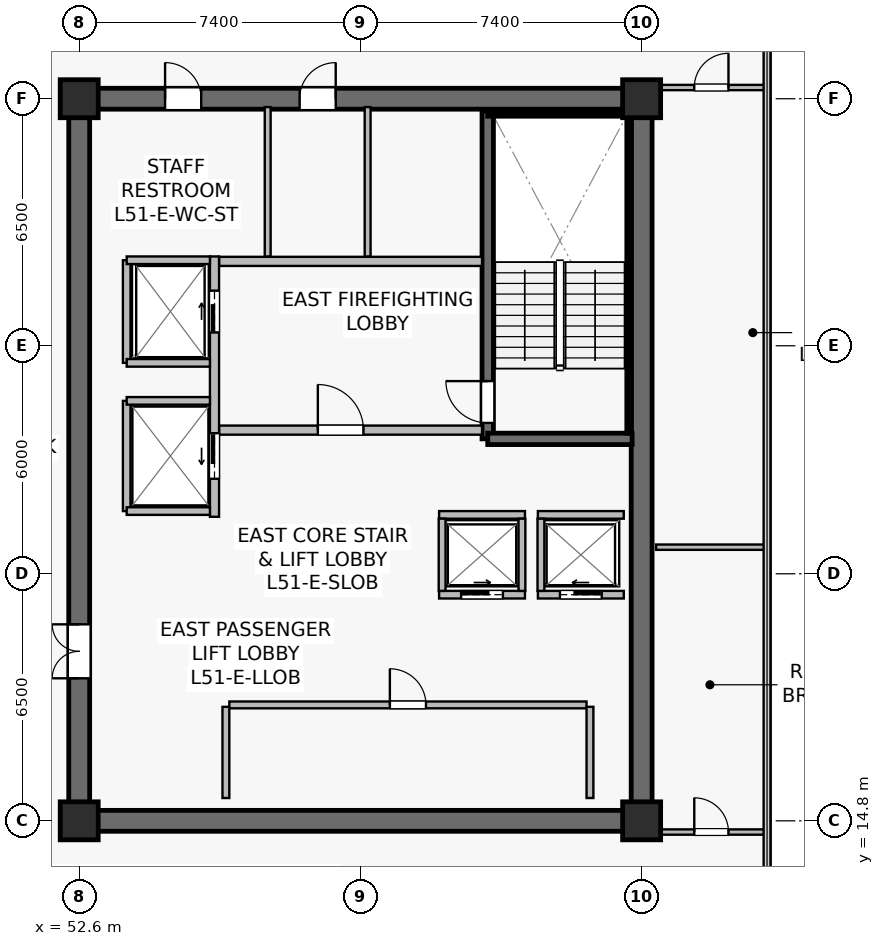
"""IFC4 building model, lengths in metres.
Left out: names, types, materials, properties, quantities, classifications, styles, units other than length and angle.
Written with IfcOpenShell. Run it as: python <this file> out.ifc"""

import sys

from ifc_helpers import new_model, si_unit, direction, frame, frame_2d, origin, origin_2d, place, context, subcontext, project, spatial, rectangle, extrude, source, transform, mapped, element, fill, save


model = new_model("IFC4")
c1 = context("Model", 3, precision=1e-05, world=origin(), true_north=direction((0.0, 1.0)))
c2 = subcontext(c1, "Body", "Model", "MODEL_VIEW")
j1 = project(units=[si_unit("LENGTHUNIT", "METRE"), si_unit("PLANEANGLEUNIT", "RADIAN")], contexts=[c1])
p1 = place(None, origin())
s1 = spatial("IfcSite", under=j1, at=p1, CompositionType="ELEMENT")
p2 = place(p1, origin())
s2 = spatial("IfcBuilding", under=s1, at=p2, CompositionType="ELEMENT")
p3 = place(p2, frame((0.0, 0.0, 213.7)))
s3 = spatial("IfcBuildingStorey", under=s2, at=p3, CompositionType="ELEMENT", Elevation=213.7)
p4 = place(p3, frame((52.325, 14.8, 0.0), z_axis=(0.0, 0.0, 1.0), x_axis=(1.0, 0.0, 0.0)))
e1 = element("IfcWall", 1, at=p4, inside=s3, PredefinedType="SHEAR", context=c2, shape_type="SweptSolid", body=[
    extrude(rectangle(XDim=15.35, YDim=0.55, at=frame_2d((7.675, 0.0))), origin(), (0.0, 0.0, 1.0), 3.8),
])
p5 = place(p3, frame((52.325, 33.8, 0.0), z_axis=(0.0, 0.0, 1.0), x_axis=(1.0, 0.0, 0.0)))
e2 = element("IfcWall", 2, at=p5, inside=s3, PredefinedType="SHEAR", context=c2, shape_type="SweptSolid", body=[
    extrude(rectangle(XDim=15.35, YDim=0.55, at=frame_2d((7.675, 0.0))), origin(), (0.0, 0.0, 1.0), 3.8),
])
p6 = place(p5, frame((6.075, 0.0, 0.0)))
e3 = element("IfcOpeningElement", 3, at=p6, cuts=e2, PredefinedType="OPENING", context=c2, shape_type="SweptSolid", body=[
    extrude(rectangle(XDim=0.95, YDim=2.15, at=frame_2d((0.475, 1.075))), frame((0.0, 0.285, 0.0), z_axis=(0.0, -1.0, 0.0), x_axis=(1.0, 0.0, 0.0)), (0.0, 0.0, 1.0), 0.57),
])
p7 = place(p5, frame((2.535, 0.0, 0.0)))
e4 = element("IfcOpeningElement", 4, at=p7, cuts=e2, PredefinedType="OPENING", context=c2, shape_type="SweptSolid", body=[
    extrude(rectangle(XDim=0.95, YDim=2.15, at=frame_2d((0.475, 1.075))), frame((0.0, 0.285, 0.0), z_axis=(0.0, -1.0, 0.0), x_axis=(1.0, 0.0, 0.0)), (0.0, 0.0, 1.0), 0.57),
])
p8 = place(p3, frame((52.6, 15.075, 0.0), z_axis=(0.0, 0.0, 1.0), x_axis=(0.0, 1.0, 0.0)))
e5 = element("IfcWall", 5, at=p8, inside=s3, PredefinedType="SHEAR", context=c2, shape_type="SweptSolid", body=[
    extrude(rectangle(XDim=18.45, YDim=0.55, at=frame_2d((9.225, 0.0))), origin(), (0.0, 0.0, 1.0), 3.8),
])
p9 = place(p8, frame((3.475, 0.0, 0.0)))
e6 = element("IfcOpeningElement", 6, at=p9, cuts=e5, PredefinedType="OPENING", context=c2, shape_type="SweptSolid", body=[
    extrude(rectangle(XDim=1.42, YDim=2.2, at=frame_2d((0.71, 1.1))), frame((0.0, 0.285, 0.0), z_axis=(0.0, -1.0, 0.0), x_axis=(1.0, 0.0, 0.0)), (0.0, 0.0, 1.0), 0.57),
])
p10 = place(p3, frame((67.4, 15.075, 0.0), z_axis=(0.0, 0.0, 1.0), x_axis=(0.0, 1.0, 0.0)))
e7 = element("IfcWall", 7, at=p10, inside=s3, PredefinedType="SHEAR", context=c2, shape_type="SweptSolid", body=[
    extrude(rectangle(XDim=18.45, YDim=0.55, at=frame_2d((9.225, 0.0))), origin(), (0.0, 0.0, 1.0), 3.8),
])
p11 = place(p3, frame((63.35, 24.85, 0.0), z_axis=(0.0, 0.0, 1.0), x_axis=(0.0, 1.0, 0.0)))
e8 = element("IfcWall", 8, at=p11, inside=s3, PredefinedType="SHEAR", context=c2, shape_type="SweptSolid", body=[
    extrude(rectangle(XDim=8.63, YDim=0.3, at=frame_2d((4.315, 0.0))), origin(), (0.0, 0.0, 1.0), 3.8),
])
p12 = place(p11, frame((0.42, 0.0, 0.0)))
e9 = element("IfcOpeningElement", 9, at=p12, cuts=e8, PredefinedType="OPENING", context=c2, shape_type="SweptSolid", body=[
    extrude(rectangle(XDim=1.1, YDim=2.15, at=frame_2d((0.55, 1.075))), frame((0.0, 0.16, 0.0), z_axis=(0.0, -1.0, 0.0), x_axis=(1.0, 0.0, 0.0)), (0.0, 0.0, 1.0), 0.32),
])
p13 = place(p3, frame((63.35, 24.85, 0.0), z_axis=(0.0, 0.0, 1.0), x_axis=(1.0, 0.0, 0.0)))
e10 = element("IfcWall", 10, at=p13, inside=s3, PredefinedType="SHEAR", context=c2, shape_type="SweptSolid", body=[
    extrude(rectangle(XDim=3.8, YDim=0.3, at=frame_2d((1.9, 0.0))), origin(), (0.0, 0.0, 1.0), 3.8),
])
p14 = place(p3, frame((63.35, 33.4, 0.0), z_axis=(0.0, 0.0, 1.0), x_axis=(1.0, 0.0, 0.0)))
e11 = element("IfcWall", 11, at=p14, inside=s3, PredefinedType="SOLIDWALL", context=c2, shape_type="SweptSolid", body=[
    extrude(rectangle(XDim=3.72, YDim=0.12, at=frame_2d((1.86, 0.0))), origin(), (0.0, 0.0, 1.0), 3.8),
])
p15 = place(p3, frame((67.07, 25.0, 0.0), z_axis=(0.0, 0.0, 1.0), x_axis=(0.0, 1.0, 0.0)))
e12 = element("IfcWall", 12, at=p15, inside=s3, PredefinedType="SOLIDWALL", context=c2, shape_type="SweptSolid", body=[
    extrude(rectangle(XDim=8.32, YDim=0.12, at=frame_2d((4.16, 0.0))), origin(), (0.0, 0.0, 1.0), 3.8),
])
m1 = source(origin(), c2, "Body", "SweptSolid", [
    extrude(rectangle(XDim=1.0, YDim=1.0, at=origin_2d()), origin(), (0.0, 0.0, 1.0), 4.1),
])
for number, where, z_axis, x_axis in (
    (13, (52.6, 14.8, 0.0), (0.0, 0.0, 1.0), (1.0, 0.0, 0.0)),
    (14, (67.4, 14.8, 0.0), (0.0, 0.0, 1.0), (1.0, 0.0, 0.0)),
    (15, (52.6, 33.8, 0.0), (0.0, 0.0, 1.0), (1.0, 0.0, 0.0)),
    (16, (67.4, 33.8, 0.0), (0.0, 0.0, 1.0), (1.0, 0.0, 0.0)),
):
    element("IfcColumn", number, at=place(p3, frame(where, z_axis=z_axis, x_axis=x_axis)), inside=s3, PredefinedType="COLUMN", context=c2, shape_type="MappedRepresentation", body=[
        mapped(m1, transform((0.0, 0.0, 0.0), scale=1.0)),
    ])
p16 = place(p3, frame((56.28, 25.08, 0.0), z_axis=(0.0, 0.0, 1.0), x_axis=(1.0, 0.0, 0.0)))
e17 = element("IfcWall", 17, at=p16, inside=s3, PredefinedType="SOLIDWALL", context=c2, shape_type="SweptSolid", body=[
    extrude(rectangle(XDim=6.92, YDim=0.24, at=frame_2d((3.46, 0.0))), origin(), (0.0, 0.0, 1.0), 3.197),
])
p17 = place(p16, frame((2.6, 0.0, 0.0)))
e18 = element("IfcOpeningElement", 18, at=p17, cuts=e17, PredefinedType="OPENING", context=c2, shape_type="SweptSolid", body=[
    extrude(rectangle(XDim=1.2, YDim=2.16, at=frame_2d((0.6, 1.08))), frame((0.0, 0.13, 0.0), z_axis=(0.0, -1.0, 0.0), x_axis=(1.0, 0.0, 0.0)), (0.0, 0.0, 1.0), 0.26),
])
p18 = place(p3, frame((56.28, 29.52, 0.0), z_axis=(0.0, 0.0, 1.0), x_axis=(1.0, 0.0, 0.0)))
e19 = element("IfcWall", 19, at=p18, inside=s3, PredefinedType="SOLIDWALL", context=c2, shape_type="SweptSolid", body=[
    extrude(rectangle(XDim=6.92, YDim=0.24, at=frame_2d((3.46, 0.0))), origin(), (0.0, 0.0, 1.0), 3.197),
])
p19 = place(p3, frame((56.16, 22.8, 0.0), z_axis=(0.0, 0.0, 1.0), x_axis=(0.0, 1.0, 0.0)))
e20 = element("IfcWall", 20, at=p19, inside=s3, PredefinedType="SOLIDWALL", context=c2, shape_type="SweptSolid", body=[
    extrude(rectangle(XDim=6.85, YDim=0.24, at=frame_2d((3.425, 0.0))), origin(), (0.0, 0.0, 1.0), 2.935),
])
p20 = place(p19, frame((4.85, 0.0, 0.0)))
e21 = element("IfcOpeningElement", 21, at=p20, cuts=e20, PredefinedType="OPENING", context=c2, shape_type="SweptSolid", body=[
    extrude(rectangle(XDim=1.1, YDim=2.22, at=frame_2d((0.55, 1.11))), frame((0.0, 0.13, 0.0), z_axis=(0.0, -1.0, 0.0), x_axis=(1.0, 0.0, 0.0)), (0.0, 0.0, 1.0), 0.26),
])
p21 = place(p19, frame((1.0, 0.0, 0.0)))
e22 = element("IfcOpeningElement", 22, at=p21, cuts=e20, PredefinedType="OPENING", context=c2, shape_type="SweptSolid", body=[
    extrude(rectangle(XDim=1.2, YDim=2.22, at=frame_2d((0.6, 1.11))), frame((0.0, 0.13, 0.0), z_axis=(0.0, -1.0, 0.0), x_axis=(1.0, 0.0, 0.0)), (0.0, 0.0, 1.0), 0.26),
])
p22 = place(p3, frame((64.67, 20.75, 0.0), z_axis=(0.0, 0.0, 1.0), x_axis=(1.0, 0.0, 0.0)))
e23 = element("IfcWall", 23, at=p22, inside=s3, PredefinedType="SOLIDWALL", context=c2, shape_type="SweptSolid", body=[
    extrude(rectangle(XDim=2.26, YDim=0.2, at=frame_2d((1.13, 0.0))), origin(), (0.0, 0.0, 1.0), 3.8),
])
p23 = place(p22, frame((0.58, 0.0, 0.0)))
e24 = element("IfcOpeningElement", 24, at=p23, cuts=e23, PredefinedType="OPENING", context=c2, shape_type="SweptSolid", body=[
    extrude(rectangle(XDim=1.1, YDim=2.22, at=frame_2d((0.55, 1.11))), frame((0.0, 0.11, 0.0), z_axis=(0.0, -1.0, 0.0), x_axis=(1.0, 0.0, 0.0)), (0.0, 0.0, 1.0), 0.22),
])
p24 = place(p3, frame((64.67, 22.85, 0.0), z_axis=(0.0, 0.0, 1.0), x_axis=(1.0, 0.0, 0.0)))
e25 = element("IfcWall", 25, at=p24, inside=s3, PredefinedType="SOLIDWALL", context=c2, shape_type="SweptSolid", body=[
    extrude(rectangle(XDim=2.26, YDim=0.2, at=frame_2d((1.13, 0.0))), origin(), (0.0, 0.0, 1.0), 3.8),
])
p25 = place(p3, frame((64.75, 20.85, 0.0), z_axis=(0.0, 0.0, 1.0), x_axis=(0.0, 1.0, 0.0)))
e26 = element("IfcWall", 26, at=p25, inside=s3, PredefinedType="SOLIDWALL", context=c2, shape_type="SweptSolid", body=[
    extrude(rectangle(XDim=1.9, YDim=0.18, at=frame_2d((0.95, 0.0))), origin(), (0.0, 0.0, 1.0), 3.8),
])
p26 = place(p3, frame((62.07, 20.75, 0.0), z_axis=(0.0, 0.0, 1.0), x_axis=(1.0, 0.0, 0.0)))
e27 = element("IfcWall", 27, at=p26, inside=s3, PredefinedType="SOLIDWALL", context=c2, shape_type="SweptSolid", body=[
    extrude(rectangle(XDim=2.26, YDim=0.2, at=frame_2d((1.13, 0.0))), origin(), (0.0, 0.0, 1.0), 3.8),
])
p27 = place(p26, frame((0.58, 0.0, 0.0)))
e28 = element("IfcOpeningElement", 28, at=p27, cuts=e27, PredefinedType="OPENING", context=c2, shape_type="SweptSolid", body=[
    extrude(rectangle(XDim=1.1, YDim=2.22, at=frame_2d((0.55, 1.11))), frame((0.0, 0.11, 0.0), z_axis=(0.0, -1.0, 0.0), x_axis=(1.0, 0.0, 0.0)), (0.0, 0.0, 1.0), 0.22),
])
p28 = place(p3, frame((62.07, 22.85, 0.0), z_axis=(0.0, 0.0, 1.0), x_axis=(1.0, 0.0, 0.0)))
e29 = element("IfcWall", 29, at=p28, inside=s3, PredefinedType="SOLIDWALL", context=c2, shape_type="SweptSolid", body=[
    extrude(rectangle(XDim=2.26, YDim=0.2, at=frame_2d((1.13, 0.0))), origin(), (0.0, 0.0, 1.0), 3.8),
])
for number, where, z_axis, x_axis in (
    (30, (62.15, 20.85, 0.0), (0.0, 0.0, 1.0), (0.0, 1.0, 0.0)),
    (31, (64.25, 20.85, 0.0), (0.0, 0.0, 1.0), (0.0, 1.0, 0.0)),
):
    element("IfcWall", number, at=place(p3, frame(where, z_axis=z_axis, x_axis=x_axis)), inside=s3, PredefinedType="SOLIDWALL", context=c2, shape_type="SweptSolid", body=[
        extrude(rectangle(XDim=1.9, YDim=0.18, at=frame_2d((0.95, 0.0))), origin(), (0.0, 0.0, 1.0), 3.8),
    ])
p29 = place(p3, frame((53.85, 26.85, 0.0), z_axis=(0.0, 0.0, 1.0), x_axis=(0.0, 1.0, 0.0)))
e32 = element("IfcWall", 32, at=p29, inside=s3, PredefinedType="SOLIDWALL", context=c2, shape_type="SweptSolid", body=[
    extrude(rectangle(XDim=2.7, YDim=0.2, at=frame_2d((1.35, 0.0))), origin(), (0.0, 0.0, 1.0), 3.8),
])
p30 = place(p3, frame((53.85, 29.55, 0.0), z_axis=(0.0, 0.0, 1.0), x_axis=(1.0, 0.0, 0.0)))
e33 = element("IfcWall", 33, at=p30, inside=s3, PredefinedType="SOLIDWALL", context=c2, shape_type="SweptSolid", body=[
    extrude(rectangle(XDim=2.19, YDim=0.2, at=frame_2d((1.095, 0.0))), origin(), (0.0, 0.0, 1.0), 3.8),
])
p31 = place(p3, frame((53.85, 26.85, 0.0), z_axis=(0.0, 0.0, 1.0), x_axis=(1.0, 0.0, 0.0)))
e34 = element("IfcWall", 34, at=p31, inside=s3, PredefinedType="SOLIDWALL", context=c2, shape_type="SweptSolid", body=[
    extrude(rectangle(XDim=2.19, YDim=0.2, at=frame_2d((1.095, 0.0))), origin(), (0.0, 0.0, 1.0), 3.197),
])
p32 = place(p3, frame((53.85, 22.95, 0.0), z_axis=(0.0, 0.0, 1.0), x_axis=(0.0, 1.0, 0.0)))
e35 = element("IfcWall", 35, at=p32, inside=s3, PredefinedType="SOLIDWALL", context=c2, shape_type="SweptSolid", body=[
    extrude(rectangle(XDim=2.9, YDim=0.2, at=frame_2d((1.45, 0.0))), origin(), (0.0, 0.0, 1.0), 2.935),
])
for number, where, z_axis, x_axis in (
    (36, (53.85, 25.85, 0.0), (0.0, 0.0, 1.0), (1.0, 0.0, 0.0)),
    (37, (53.85, 22.95, 0.0), (0.0, 0.0, 1.0), (1.0, 0.0, 0.0)),
):
    element("IfcWall", number, at=place(p3, frame(where, z_axis=z_axis, x_axis=x_axis)), inside=s3, PredefinedType="SOLIDWALL", context=c2, shape_type="SweptSolid", body=[
        extrude(rectangle(XDim=2.19, YDim=0.2, at=frame_2d((1.095, 0.0))), origin(), (0.0, 0.0, 1.0), 3.8),
    ])
p33 = place(p3, frame((56.55, 17.85, 0.0), z_axis=(0.0, 0.0, 1.0), x_axis=(1.0, 0.0, 0.0)))
e38 = element("IfcWall", 38, at=p33, inside=s3, PredefinedType="SOLIDWALL", context=c2, shape_type="SweptSolid", body=[
    extrude(rectangle(XDim=9.4, YDim=0.18, at=frame_2d((4.7, 0.0))), origin(), (0.0, 0.0, 1.0), 3.197),
])
p34 = place(p33, frame((4.225, 0.0, 0.0)))
e39 = element("IfcOpeningElement", 39, at=p34, cuts=e38, PredefinedType="OPENING", context=c2, shape_type="SweptSolid", body=[
    extrude(rectangle(XDim=0.95, YDim=2.15, at=frame_2d((0.475, 1.075))), frame((0.0, 0.1, 0.0), z_axis=(0.0, -1.0, 0.0), x_axis=(1.0, 0.0, 0.0)), (0.0, 0.0, 1.0), 0.2),
])
for number, where, z_axis, x_axis in (
    (40, (56.46, 15.4, 0.0), (0.0, 0.0, 1.0), (0.0, 1.0, 0.0)),
    (41, (66.04, 15.4, 0.0), (0.0, 0.0, 1.0), (0.0, 1.0, 0.0)),
):
    element("IfcWall", number, at=place(p3, frame(where, z_axis=z_axis, x_axis=x_axis)), inside=s3, PredefinedType="SOLIDWALL", context=c2, shape_type="SweptSolid", body=[
        extrude(rectangle(XDim=2.4, YDim=0.18, at=frame_2d((1.2, 0.0))), origin(), (0.0, 0.0, 1.0), 3.8),
    ])
p35 = place(p3, frame((60.19, 29.65, 0.0), z_axis=(0.0, 0.0, 1.0), x_axis=(0.0, 1.0, 0.0)))
e42 = element("IfcWall", 42, at=p35, inside=s3, PredefinedType="PLUMBINGWALL", context=c2, shape_type="SweptSolid", body=[
    extrude(rectangle(XDim=3.93, YDim=0.155, at=frame_2d((1.965, 0.0))), origin(), (0.0, 0.0, 1.0), 3.197),
])
p36 = place(p3, frame((57.56, 29.65, 0.0), z_axis=(0.0, 0.0, 1.0), x_axis=(0.0, 1.0, 0.0)))
e43 = element("IfcWall", 43, at=p36, inside=s3, PredefinedType="PLUMBINGWALL", context=c2, shape_type="SweptSolid", body=[
    extrude(rectangle(XDim=3.93, YDim=0.155, at=frame_2d((1.965, 0.0))), origin(), (0.0, 0.0, 1.0), 3.8),
])
p37 = place(p3, frame((67.78, 22.0, 0.0), z_axis=(0.0, 0.0, 1.0), x_axis=(1.0, 0.0, 0.0)))
e44 = element("IfcWall", 44, at=p37, inside=s3, PredefinedType="PARTITIONING", context=c2, shape_type="SweptSolid", body=[
    extrude(rectangle(XDim=2.91, YDim=0.14, at=frame_2d((1.455, 0.0))), origin(), (0.0, 0.0, 1.0), 3.8),
])
p38 = place(p3, frame((67.78, 14.505, 0.0), z_axis=(0.0, 0.0, 1.0), x_axis=(1.0, 0.0, 0.0)))
e45 = element("IfcWall", 45, at=p38, inside=s3, PredefinedType="PARTITIONING", context=c2, shape_type="SweptSolid", body=[
    extrude(rectangle(XDim=2.91, YDim=0.14, at=frame_2d((1.455, 0.0))), origin(), (0.0, 0.0, 1.0), 3.8),
])
p39 = place(p38, frame((1.005, 0.0, 0.0)))
e46 = element("IfcOpeningElement", 46, at=p39, cuts=e45, PredefinedType="OPENING", context=c2, shape_type="SweptSolid", body=[
    extrude(rectangle(XDim=0.9, YDim=2.1, at=frame_2d((0.45, 1.05))), frame((0.0, 0.08, 0.0), z_axis=(0.0, -1.0, 0.0), x_axis=(1.0, 0.0, 0.0)), (0.0, 0.0, 1.0), 0.16),
])
p40 = place(p3, frame((67.78, 34.095, 0.0), z_axis=(0.0, 0.0, 1.0), x_axis=(1.0, 0.0, 0.0)))
e47 = element("IfcWall", 47, at=p40, inside=s3, PredefinedType="PARTITIONING", context=c2, shape_type="SweptSolid", body=[
    extrude(rectangle(XDim=2.91, YDim=0.14, at=frame_2d((1.455, 0.0))), origin(), (0.0, 0.0, 1.0), 3.8),
])
p41 = place(p40, frame((1.005, 0.0, 0.0)))
e48 = element("IfcOpeningElement", 48, at=p41, cuts=e47, PredefinedType="OPENING", context=c2, shape_type="SweptSolid", body=[
    extrude(rectangle(XDim=0.9, YDim=2.1, at=frame_2d((0.45, 1.05))), frame((0.0, 0.08, 0.0), z_axis=(0.0, -1.0, 0.0), x_axis=(1.0, 0.0, 0.0)), (0.0, 0.0, 1.0), 0.16),
])
m2 = source(origin(), c2, "Body", "SweptSolid", [
    extrude(rectangle(XDim=1.1, YDim=2.15, at=frame_2d((0.55, 1.075))), frame((0.0, 0.025, 0.0), z_axis=(0.0, -1.0, 0.0), x_axis=(1.0, 0.0, 0.0)), (0.0, 0.0, 1.0), 0.05),
])
p42 = place(p12, origin())
e49 = element("IfcDoor", 49, at=p42, inside=s3, OperationType="SINGLE_SWING_RIGHT", PredefinedType="DOOR", context=c2, shape_type="MappedRepresentation", body=[
    mapped(m2, transform((0.0, 0.0, 0.0), scale=1.0)),
])
fill(e9, e49)
m3 = source(origin(), c2, "Body", "SweptSolid", [
    extrude(rectangle(XDim=1.2, YDim=2.16, at=frame_2d((0.6, 1.08))), frame((0.0, 0.025, 0.0), z_axis=(0.0, -1.0, 0.0), x_axis=(1.0, 0.0, 0.0)), (0.0, 0.0, 1.0), 0.05),
])
p43 = place(p17, origin())
e50 = element("IfcDoor", 50, at=p43, inside=s3, OperationType="SINGLE_SWING_LEFT", PredefinedType="DOOR", context=c2, shape_type="MappedRepresentation", body=[
    mapped(m3, transform((0.0, 0.0, 0.0), scale=1.0)),
])
fill(e18, e50)
m4 = source(origin(), c2, "Body", "SweptSolid", [
    extrude(rectangle(XDim=1.1, YDim=2.22, at=frame_2d((0.55, 1.11))), frame((0.0, 0.025, 0.0), z_axis=(0.0, -1.0, 0.0), x_axis=(1.0, 0.0, 0.0)), (0.0, 0.0, 1.0), 0.05),
])
p44 = place(p23, origin())
e51 = element("IfcDoor", 51, at=p44, inside=s3, OperationType="SLIDING_TO_LEFT", PredefinedType="USERDEFINED", context=c2, shape_type="MappedRepresentation", body=[
    mapped(m4, transform((0.0, 0.0, 0.0), scale=1.0)),
])
fill(e24, e51)
p45 = place(p27, origin())
e52 = element("IfcDoor", 52, at=p45, inside=s3, OperationType="SLIDING_TO_RIGHT", PredefinedType="USERDEFINED", context=c2, shape_type="MappedRepresentation", body=[
    mapped(m4, transform((0.0, 0.0, 0.0), scale=1.0)),
])
fill(e28, e52)
p46 = place(p20, origin())
e53 = element("IfcDoor", 53, at=p46, inside=s3, OperationType="SLIDING_TO_RIGHT", PredefinedType="USERDEFINED", context=c2, shape_type="MappedRepresentation", body=[
    mapped(m4, transform((0.0, 0.0, 0.0), scale=1.0)),
])
fill(e21, e53)
m5 = source(origin(), c2, "Body", "SweptSolid", [
    extrude(rectangle(XDim=1.2, YDim=2.22, at=frame_2d((0.6, 1.11))), frame((0.0, 0.025, 0.0), z_axis=(0.0, -1.0, 0.0), x_axis=(1.0, 0.0, 0.0)), (0.0, 0.0, 1.0), 0.05),
])
p47 = place(p21, origin())
e54 = element("IfcDoor", 54, at=p47, inside=s3, OperationType="SLIDING_TO_LEFT", PredefinedType="USERDEFINED", context=c2, shape_type="MappedRepresentation", body=[
    mapped(m5, transform((0.0, 0.0, 0.0), scale=1.0)),
])
fill(e22, e54)
m6 = source(origin(), c2, "Body", "SweptSolid", [
    extrude(rectangle(XDim=0.95, YDim=2.15, at=frame_2d((0.475, 1.075))), frame((0.0, 0.025, 0.0), z_axis=(0.0, -1.0, 0.0), x_axis=(1.0, 0.0, 0.0)), (0.0, 0.0, 1.0), 0.05),
])
p48 = place(p34, origin())
e55 = element("IfcDoor", 55, at=p48, inside=s3, OperationType="SINGLE_SWING_LEFT", PredefinedType="DOOR", context=c2, shape_type="MappedRepresentation", body=[
    mapped(m6, transform((0.0, 0.0, 0.0), scale=1.0)),
])
fill(e39, e55)
m7 = source(origin(), c2, "Body", "SweptSolid", [
    extrude(rectangle(XDim=1.42, YDim=2.2, at=frame_2d((0.71, 1.1))), frame((0.0, 0.025, 0.0), z_axis=(0.0, -1.0, 0.0), x_axis=(1.0, 0.0, 0.0)), (0.0, 0.0, 1.0), 0.05),
])
p49 = place(p9, origin())
e56 = element("IfcDoor", 56, at=p49, inside=s3, OperationType="DOUBLE_DOOR_SINGLE_SWING", PredefinedType="DOOR", context=c2, shape_type="MappedRepresentation", body=[
    mapped(m7, transform((0.0, 0.0, 0.0), scale=1.0)),
])
fill(e6, e56)
p50 = place(p6, origin())
e57 = element("IfcDoor", 57, at=p50, inside=s3, OperationType="SINGLE_SWING_RIGHT", PredefinedType="DOOR", context=c2, shape_type="MappedRepresentation", body=[
    mapped(m6, transform((0.0, 0.0, 0.0), scale=1.0)),
])
fill(e3, e57)
p51 = place(p7, origin())
e58 = element("IfcDoor", 58, at=p51, inside=s3, OperationType="SINGLE_SWING_LEFT", PredefinedType="DOOR", context=c2, shape_type="MappedRepresentation", body=[
    mapped(m6, transform((0.0, 0.0, 0.0), scale=1.0)),
])
fill(e4, e58)
m8 = source(origin(), c2, "Body", "SweptSolid", [
    extrude(rectangle(XDim=0.9, YDim=2.1, at=frame_2d((0.45, 1.05))), frame((0.0, 0.025, 0.0), z_axis=(0.0, -1.0, 0.0), x_axis=(1.0, 0.0, 0.0)), (0.0, 0.0, 1.0), 0.05),
])
p52 = place(p39, origin())
e59 = element("IfcDoor", 59, at=p52, inside=s3, OperationType="SINGLE_SWING_LEFT", PredefinedType="DOOR", context=c2, shape_type="MappedRepresentation", body=[
    mapped(m8, transform((0.0, 0.0, 0.0), scale=1.0)),
])
fill(e46, e59)
p53 = place(p41, origin())
e60 = element("IfcDoor", 60, at=p53, inside=s3, OperationType="SINGLE_SWING_RIGHT", PredefinedType="DOOR", context=c2, shape_type="MappedRepresentation", body=[
    mapped(m8, transform((0.0, 0.0, 0.0), scale=1.0)),
])
fill(e48, e60)
save(model, sys.argv[1])
